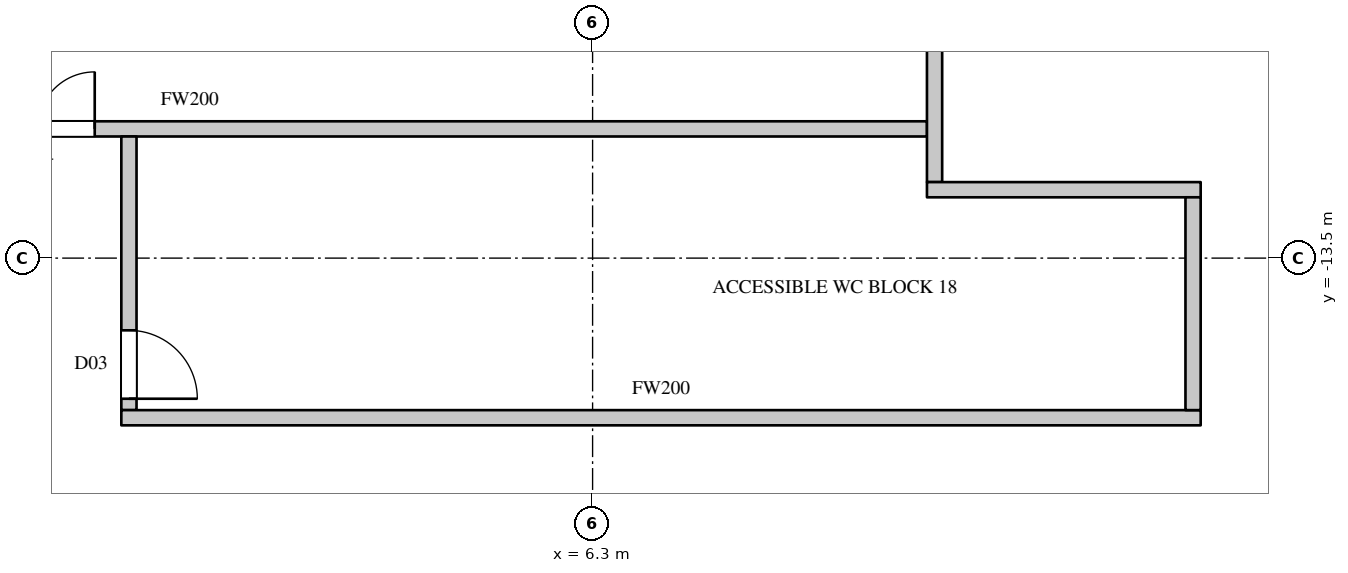
"""IFC4 building model, lengths in metres.
Left out: names, types, materials, properties, quantities, classifications, styles, units other than length and angle.
Written with IfcOpenShell. Run it as: python <this file> out.ifc"""

import sys

from ifc_helpers import new_model, si_unit, direction, frame, frame_2d, origin, place, context, subcontext, project, spatial, rectangle, extrude, element, fill, save


model = new_model("IFC4")
c1 = context("Model", 3, precision=1e-05, world=origin(), true_north=direction((0.0, 1.0)))
c2 = subcontext(c1, "Body", "Model", "MODEL_VIEW")
j1 = project(units=[si_unit("LENGTHUNIT", "METRE"), si_unit("PLANEANGLEUNIT", "RADIAN")], contexts=[c1])
p1 = place(None, origin())
s1 = spatial("IfcSite", under=j1, at=p1, CompositionType="ELEMENT")
p2 = place(p1, origin())
s2 = spatial("IfcBuilding", under=s1, at=p2, CompositionType="ELEMENT")
p3 = place(p2, frame((0.0, 0.0, 95.1)))
s3 = spatial("IfcBuildingStorey", under=s2, at=p3, CompositionType="ELEMENT", Elevation=95.1)
p4 = place(p3, frame((-8.7, -11.8, 0.0), z_axis=(0.0, 0.0, 1.0), x_axis=(1.0, 0.0, 0.0)))
e1 = element("IfcWall", 1, at=p4, inside=s3, PredefinedType="PARTITIONING", context=c2, shape_type="SweptSolid", body=[
    extrude(rectangle(XDim=19.4, YDim=0.2, at=frame_2d((9.7, 0.0))), origin(), (0.0, 0.0, 1.0), 3.3),
])
p5 = place(p4, frame((6.95, 0.0, 0.0)))
e2 = element("IfcOpeningElement", 2, at=p5, cuts=e1, PredefinedType="OPENING", context=c2, shape_type="SweptSolid", body=[
    extrude(rectangle(XDim=1.5, YDim=2.2, at=frame_2d((0.75, 1.1))), frame((0.0, 0.11, 0.0), z_axis=(0.0, -1.0, 0.0), x_axis=(1.0, 0.0, 0.0)), (0.0, 0.0, 1.0), 0.22),
])
p6 = place(p3, frame((0.2, -15.5, 0.0), z_axis=(0.0, 0.0, 1.0), x_axis=(0.0, 1.0, 0.0)))
e3 = element("IfcWall", 3, at=p6, inside=s3, PredefinedType="PARTITIONING", context=c2, shape_type="SweptSolid", body=[
    extrude(rectangle(XDim=3.6, YDim=0.2, at=frame_2d((1.8, 0.0))), origin(), (0.0, 0.0, 1.0), 3.3),
])
p7 = place(p6, frame((0.15, 0.0, 0.0)))
e4 = element("IfcOpeningElement", 4, at=p7, cuts=e3, PredefinedType="OPENING", context=c2, shape_type="SweptSolid", body=[
    extrude(rectangle(XDim=0.9, YDim=2.2, at=frame_2d((0.45, 1.1))), frame((0.0, 0.11, 0.0), z_axis=(0.0, -1.0, 0.0), x_axis=(1.0, 0.0, 0.0)), (0.0, 0.0, 1.0), 0.22),
])
p8 = place(p3, frame((0.1, -15.6, 0.0), z_axis=(0.0, 0.0, 1.0), x_axis=(1.0, 0.0, 0.0)))
e5 = element("IfcWall", 5, at=p8, inside=s3, PredefinedType="PARTITIONING", context=c2, shape_type="SweptSolid", body=[
    extrude(rectangle(XDim=14.2, YDim=0.2, at=frame_2d((7.1, 0.0))), origin(), (0.0, 0.0, 1.0), 3.3),
])
p9 = place(p3, frame((10.799, -12.5, 0.0), z_axis=(0.0, 0.0, 1.0), x_axis=(0.0, 1.0, 0.0)))
e6 = element("IfcWall", 6, at=p9, inside=s3, PredefinedType="PARTITIONING", context=c2, shape_type="SweptSolid", body=[
    extrude(rectangle(XDim=24.2, YDim=0.2, at=frame_2d((12.1, 0.0))), origin(), (0.0, 0.0, 1.0), 3.3),
])
p10 = place(p9, frame((13.15, 0.0, 0.0)))
e7 = element("IfcOpeningElement", 7, at=p10, cuts=e6, PredefinedType="OPENING", context=c2, shape_type="SweptSolid", body=[
    extrude(rectangle(XDim=1.5, YDim=2.2, at=frame_2d((0.75, 1.1))), frame((0.0, 0.11, 0.0), z_axis=(0.0, -1.0, 0.0), x_axis=(1.0, 0.0, 0.0)), (0.0, 0.0, 1.0), 0.22),
])
p11 = place(p3, frame((10.699, -12.6, 0.0), z_axis=(0.0, 0.0, 1.0), x_axis=(1.0, 0.0, 0.0)))
e8 = element("IfcWall", 8, at=p11, inside=s3, PredefinedType="PARTITIONING", context=c2, shape_type="SweptSolid", body=[
    extrude(rectangle(XDim=3.601, YDim=0.2, at=frame_2d((1.801, 0.0))), origin(), (0.0, 0.0, 1.0), 3.3),
])
p12 = place(p3, frame((14.2, -15.5, 0.0), z_axis=(0.0, 0.0, 1.0), x_axis=(0.0, 1.0, 0.0)))
e9 = element("IfcWall", 9, at=p12, inside=s3, PredefinedType="PARTITIONING", context=c2, shape_type="SweptSolid", body=[
    extrude(rectangle(XDim=2.8, YDim=0.2, at=frame_2d((1.4, 0.0))), origin(), (0.0, 0.0, 1.0), 3.3),
])
p13 = place(p5, origin())
e10 = element("IfcDoor", 10, at=p13, inside=s3, OperationType="DOUBLE_DOOR_SINGLE_SWING", PredefinedType="DOOR", context=c2, shape_type="SweptSolid", body=[
    extrude(rectangle(XDim=1.5, YDim=2.2, at=frame_2d((0.75, 1.1))), frame((0.0, 0.025, 0.0), z_axis=(0.0, -1.0, 0.0), x_axis=(1.0, 0.0, 0.0)), (0.0, 0.0, 1.0), 0.05),
])
fill(e2, e10)
p14 = place(p7, origin())
e11 = element("IfcDoor", 11, at=p14, inside=s3, OperationType="SINGLE_SWING_RIGHT", PredefinedType="DOOR", context=c2, shape_type="SweptSolid", body=[
    extrude(rectangle(XDim=0.9, YDim=2.2, at=frame_2d((0.45, 1.1))), frame((0.0, 0.025, 0.0), z_axis=(0.0, -1.0, 0.0), x_axis=(1.0, 0.0, 0.0)), (0.0, 0.0, 1.0), 0.05),
])
fill(e4, e11)
save(model, sys.argv[1])
